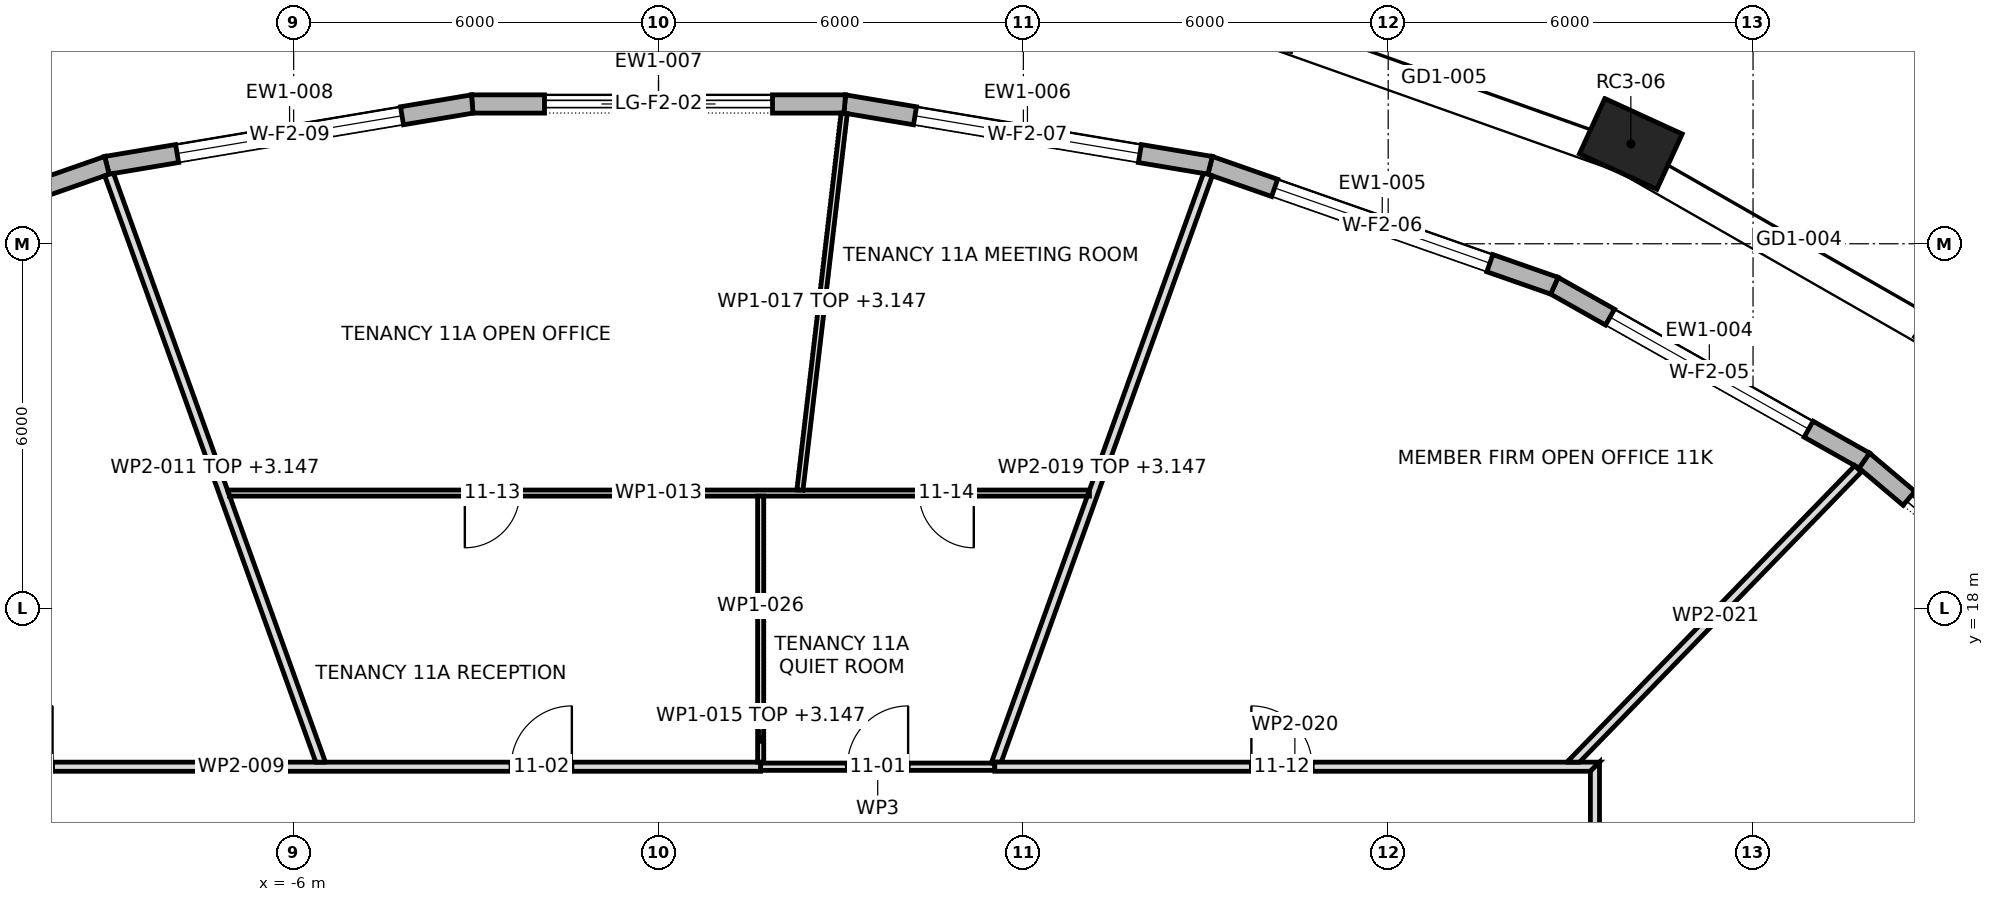
"""IFC4 building model, lengths in metres.
Left out: names, types, materials, properties, quantities, classifications, styles, units other than length and angle.
Written with IfcOpenShell. Run it as: python <this file> out.ifc"""

import sys

from ifc_helpers import new_model, si_unit, direction, frame, frame_2d, origin, origin_2d, place, context, subcontext, project, spatial, polyline, rectangle, outline, extrude, element, fill, save


model = new_model("IFC4")
c1 = context("Model", 3, precision=1e-05, world=origin(), true_north=direction((0.0, 1.0)))
c2 = subcontext(c1, "Body", "Model", "MODEL_VIEW")
j1 = project(units=[si_unit("LENGTHUNIT", "METRE"), si_unit("PLANEANGLEUNIT", "RADIAN")], contexts=[c1])
p1 = place(None, origin())
s1 = spatial("IfcSite", under=j1, at=p1, CompositionType="ELEMENT")
p2 = place(p1, origin())
s2 = spatial("IfcBuilding", under=s1, at=p2, CompositionType="ELEMENT")
p3 = place(p2, frame((0.0, 0.0, 154.9)))
s3 = spatial("IfcBuildingStorey", under=s2, at=p3, CompositionType="ELEMENT", Elevation=154.9)
for number, where, z_axis, x_axis in (
    (1, (21.519, 22.475, 0.0), (0.0, 0.0, 1.0), (-0.818, 0.575, 0.0)),
    (2, (15.99, 25.642, 0.0), (0.0, 0.0, 1.0), (-0.909, 0.417, 0.0)),
):
    element("IfcColumn", number, at=place(p3, frame(where, z_axis=z_axis, x_axis=x_axis)), inside=s3, PredefinedType="COLUMN", context=c2, shape_type="SweptSolid", body=[
        extrude(rectangle(XDim=1.4, YDim=1.0, at=origin_2d()), origin(), (0.0, 0.0, 1.0), 4.2),
    ])
p4 = place(p3, frame((24.165, 16.774, 0.0), z_axis=(0.0, 0.0, 1.0), x_axis=(-0.764076096085, 0.645126126732, 0.0)))
e3 = element("IfcWall", 3, at=p4, inside=s3, PredefinedType="STANDARD", context=c2, shape_type="SweptSolid", body=[
    extrude(outline(polyline([(-0.015, -0.15), (5.689, -0.15), (5.661, 0.15), (0.015, 0.15), (-0.015, -0.15)])), origin(), (0.0, 0.0, 1.0), 3.9),
])
p5 = place(p4, frame((0.962, 0.0, 0.0)))
e4 = element("IfcOpeningElement", 4, at=p5, cuts=e3, PredefinedType="OPENING", context=c2, shape_type="SweptSolid", body=[
    extrude(rectangle(XDim=3.75, YDim=3.45, at=frame_2d((1.875, 1.725))), frame((0.0, 0.162, 0.0), z_axis=(0.0, -1.0, 0.0), x_axis=(1.0, 0.0, 0.0)), (0.0, 0.0, 1.0), 0.324),
])
p6 = place(p3, frame((19.829, 20.435, 0.0), z_axis=(0.0, 0.0, 1.0), x_axis=(-0.870982130072, 0.491314694565, 0.0)))
e5 = element("IfcWall", 5, at=p6, inside=s3, PredefinedType="STANDARD", context=c2, shape_type="SweptSolid", body=[
    extrude(outline(polyline([(-0.014, -0.15), (5.865, -0.15), (5.838, 0.15), (0.014, 0.15), (-0.014, -0.15)])), origin(), (0.0, 0.0, 1.0), 3.9),
])
p7 = place(p6, frame((1.051, 0.0, 0.6)))
e6 = element("IfcOpeningElement", 6, at=p7, cuts=e5, PredefinedType="OPENING", context=c2, shape_type="SweptSolid", body=[
    extrude(rectangle(XDim=3.75, YDim=2.85, at=frame_2d((1.875, 1.425))), frame((0.0, 0.162, 0.0), z_axis=(0.0, -1.0, 0.0), x_axis=(1.0, 0.0, 0.0)), (0.0, 0.0, 1.0), 0.324),
])
p8 = place(p3, frame((14.732, 23.31, 0.0), z_axis=(0.0, 0.0, 1.0), x_axis=(-0.943944636678, 0.330103806228, 0.0)))
e7 = element("IfcWall", 7, at=p8, inside=s3, PredefinedType="STANDARD", context=c2, shape_type="SweptSolid", body=[
    extrude(outline(polyline([(-0.013, -0.15), (6.01, -0.15), (5.985, 0.15), (0.013, 0.15), (-0.013, -0.15)])), origin(), (0.0, 0.0, 1.0), 3.9),
])
p9 = place(p8, frame((1.124, 0.0, 0.6)))
e8 = element("IfcOpeningElement", 8, at=p9, cuts=e7, PredefinedType="OPENING", context=c2, shape_type="SweptSolid", body=[
    extrude(rectangle(XDim=3.75, YDim=2.85, at=frame_2d((1.875, 1.425))), frame((0.0, 0.162, 0.0), z_axis=(0.0, -1.0, 0.0), x_axis=(1.0, 0.0, 0.0)), (0.0, 0.0, 1.0), 0.324),
])
p10 = place(p3, frame((9.071, 25.29, 0.0), z_axis=(0.0, 0.0, 1.0), x_axis=(-0.98618955457, 0.165620537547, 0.0)))
e9 = element("IfcWall", 9, at=p10, inside=s3, PredefinedType="STANDARD", context=c2, shape_type="SweptSolid", body=[
    extrude(outline(polyline([(-0.013, -0.15), (6.105, -0.15), (6.08, 0.15), (0.013, 0.15), (-0.013, -0.15)])), origin(), (0.0, 0.0, 1.0), 3.9),
])
p11 = place(p10, frame((1.171, 0.0, 0.6)))
e10 = element("IfcOpeningElement", 10, at=p11, cuts=e9, PredefinedType="OPENING", context=c2, shape_type="SweptSolid", body=[
    extrude(rectangle(XDim=3.75, YDim=2.85, at=frame_2d((1.875, 1.425))), frame((0.0, 0.162, 0.0), z_axis=(0.0, -1.0, 0.0), x_axis=(1.0, 0.0, 0.0)), (0.0, 0.0, 1.0), 0.324),
])
p12 = place(p3, frame((3.063, 26.299, 0.0), z_axis=(0.0, 0.0, 1.0), x_axis=(-1.0, 0.0, 0.0)))
e11 = element("IfcWall", 11, at=p12, inside=s3, PredefinedType="STANDARD", context=c2, shape_type="SweptSolid", body=[
    extrude(outline(polyline([(-0.012, -0.15), (6.138, -0.15), (6.114, 0.15), (0.012, 0.15), (-0.012, -0.15)])), origin(), (0.0, 0.0, 1.0), 3.9),
])
p13 = place(p12, frame((1.188, 0.0, 0.0)))
e12 = element("IfcOpeningElement", 12, at=p13, cuts=e11, PredefinedType="OPENING", context=c2, shape_type="SweptSolid", body=[
    extrude(rectangle(XDim=3.75, YDim=3.45, at=frame_2d((1.875, 1.725))), frame((0.0, 0.162, 0.0), z_axis=(0.0, -1.0, 0.0), x_axis=(1.0, 0.0, 0.0)), (0.0, 0.0, 1.0), 0.324),
])
p14 = place(p3, frame((-3.063, 26.299, 0.0), z_axis=(0.0, 0.0, 1.0), x_axis=(-0.98618955457, -0.165620537547, 0.0)))
e13 = element("IfcWall", 13, at=p14, inside=s3, PredefinedType="STANDARD", context=c2, shape_type="SweptSolid", body=[
    extrude(outline(polyline([(-0.012, -0.15), (6.105, -0.15), (6.08, 0.15), (0.012, 0.15), (-0.012, -0.15)])), origin(), (0.0, 0.0, 1.0), 3.9),
])
p15 = place(p14, frame((1.171, 0.0, 0.6)))
e14 = element("IfcOpeningElement", 14, at=p15, cuts=e13, PredefinedType="OPENING", context=c2, shape_type="SweptSolid", body=[
    extrude(rectangle(XDim=3.75, YDim=2.85, at=frame_2d((1.875, 1.425))), frame((0.0, 0.162, 0.0), z_axis=(0.0, -1.0, 0.0), x_axis=(1.0, 0.0, 0.0)), (0.0, 0.0, 1.0), 0.324),
])
p16 = place(p3, frame((-9.071, 25.29, 0.0), z_axis=(0.0, 0.0, 1.0), x_axis=(-0.943944636678, -0.330103806228, 0.0)))
e15 = element("IfcWall", 15, at=p16, inside=s3, PredefinedType="STANDARD", context=c2, shape_type="SweptSolid", body=[
    extrude(outline(polyline([(-0.013, -0.15), (6.011, -0.15), (5.984, 0.15), (0.013, 0.15), (-0.013, -0.15)])), origin(), (0.0, 0.0, 1.0), 3.9),
])
p17 = place(p16, frame((1.124, 0.0, 0.6)))
e16 = element("IfcOpeningElement", 16, at=p17, cuts=e15, PredefinedType="OPENING", context=c2, shape_type="SweptSolid", body=[
    extrude(rectangle(XDim=3.75, YDim=2.85, at=frame_2d((1.875, 1.425))), frame((0.0, 0.162, 0.0), z_axis=(0.0, -1.0, 0.0), x_axis=(1.0, 0.0, 0.0)), (0.0, 0.0, 1.0), 0.324),
])
p18 = place(p3, frame((-15.475, 15.4, 0.0), z_axis=(0.0, 0.0, 1.0), x_axis=(1.0, 0.0, 0.0)))
e17 = element("IfcWall", 17, at=p18, inside=s3, PredefinedType="PARTITIONING", context=c2, shape_type="SweptSolid", body=[
    extrude(outline(polyline([(17.155, 0.075), (15.249, 0.075), (13.343, 0.075), (11.437, 0.075), (9.531, 0.075), (7.625, 0.075), (5.719, 0.075), (3.812, 0.075), (1.906, 0.075), (0.0, 0.075), (0.15, -0.075), (2.04, -0.075), (3.929, -0.075), (5.818, -0.075), (7.708, -0.075), (9.597, -0.075), (11.487, -0.075), (13.376, -0.075), (15.266, -0.075), (17.155, -0.075), (17.155, 0.075)])), origin(), (0.0, 0.0, 1.0), 3.9),
])
p19 = place(p18, frame((13.05, 0.0, 0.0)))
e18 = element("IfcOpeningElement", 18, at=p19, cuts=e17, PredefinedType="OPENING", context=c2, shape_type="SweptSolid", body=[
    extrude(rectangle(XDim=1.0, YDim=2.1, at=frame_2d((0.5, 1.05))), frame((0.0, 0.087, 0.0), z_axis=(0.0, -1.0, 0.0), x_axis=(1.0, 0.0, 0.0)), (0.0, 0.0, 1.0), 0.174),
])
p20 = place(p18, frame((4.51, 0.0, 0.0)))
e19 = element("IfcOpeningElement", 19, at=p20, cuts=e17, PredefinedType="OPENING", context=c2, shape_type="SweptSolid", body=[
    extrude(rectangle(XDim=1.0, YDim=2.1, at=frame_2d((0.5, 1.05))), frame((0.0, 0.087, 0.0), z_axis=(0.0, -1.0, 0.0), x_axis=(1.0, 0.0, 0.0)), (0.0, 0.0, 1.0), 0.174),
])
p21 = place(p3, frame((-9.037, 25.143, 0.0), z_axis=(0.0, 0.0, 1.0), x_axis=(0.338668278724, -0.940905838533, 0.0)))
e20 = element("IfcWall", 20, at=p21, inside=s3, PredefinedType="PARTITIONING", context=c2, shape_type="SweptSolid", body=[
    extrude(outline(polyline([(0.0, -0.075), (1.708, -0.075), (3.416, -0.075), (5.124, -0.075), (6.832, -0.075), (8.541, -0.075), (10.249, -0.075), (10.3, 0.069), (10.3, 0.069), (10.302, 0.074), (10.302, 0.075), (8.752, 0.075), (7.203, 0.075), (5.653, 0.075), (5.653, 0.074), (5.651, 0.075), (3.772, 0.075), (1.893, 0.075), (0.014, 0.075), (0.0, 0.003), (0.0, -0.054), (0.0, -0.075)])), origin(), (0.0, 0.0, 1.0), 3.147),
])
p22 = place(p3, frame((-7.087, 19.9, 0.0), z_axis=(0.0, 0.0, 1.0), x_axis=(1.0, 0.0, 0.0)))
e21 = element("IfcWall", 21, at=p22, inside=s3, PredefinedType="PARTITIONING", context=c2, shape_type="SweptSolid", body=[
    extrude(outline(polyline([(0.036, -0.05), (1.772, -0.05), (3.508, -0.05), (5.245, -0.05), (6.981, -0.05), (8.717, -0.05), (8.717, -0.05), (8.817, -0.05), (8.817, -0.05), (10.591, -0.05), (12.365, -0.05), (14.139, -0.05), (14.175, 0.049), (14.175, 0.05), (12.604, 0.05), (11.034, 0.05), (9.464, 0.05), (9.464, 0.049), (9.454, 0.05), (7.563, 0.05), (5.672, 0.05), (3.781, 0.05), (1.891, 0.05), (0.0, 0.05), (0.0, 0.049), (0.036, -0.05)])), origin(), (0.0, 0.0, 1.0), 3.9),
])
p23 = place(p22, frame((3.903, 0.0, 0.0)))
e22 = element("IfcOpeningElement", 22, at=p23, cuts=e21, PredefinedType="OPENING", context=c2, shape_type="SweptSolid", body=[
    extrude(rectangle(XDim=0.9, YDim=2.1, at=frame_2d((0.45, 1.05))), frame((0.0, 0.062, 0.0), z_axis=(0.0, -1.0, 0.0), x_axis=(1.0, 0.0, 0.0)), (0.0, 0.0, 1.0), 0.124),
])
p24 = place(p22, frame((11.373, 0.0, 0.0)))
e23 = element("IfcOpeningElement", 23, at=p24, cuts=e21, PredefinedType="OPENING", context=c2, shape_type="SweptSolid", body=[
    extrude(rectangle(XDim=0.9, YDim=2.1, at=frame_2d((0.45, 1.05))), frame((0.0, 0.062, 0.0), z_axis=(0.0, -1.0, 0.0), x_axis=(1.0, 0.0, 0.0)), (0.0, 0.0, 1.0), 0.124),
])
p25 = place(p3, frame((1.68, 15.46, 0.0), z_axis=(0.0, 0.0, 1.0), x_axis=(0.0, 1.0, 0.0)))
e24 = element("IfcWall", 24, at=p25, inside=s3, PredefinedType="PARTITIONING", context=c2, shape_type="SweptSolid", body=[
    extrude(outline(polyline([(0.777, 0.05), (0.015, 0.05), (0.015, 0.0), (0.0, 0.0), (0.0, -0.05), (0.777, -0.05), (0.777, 0.05)])), origin(), (0.0, 0.0, 1.0), 3.147),
])
p26 = place(p3, frame((1.68, 15.4, 0.0), z_axis=(0.0, 0.0, 1.0), x_axis=(1.0, 0.0, 0.0)))
e25 = element("IfcWall", 25, at=p26, inside=s3, PredefinedType="PARTITIONING", context=c2, shape_type="SweptSolid", body=[
    extrude(rectangle(XDim=3.85, YDim=0.12, at=frame_2d((1.925, 0.0))), origin(), (0.0, 0.0, 1.0), 3.9),
])
p27 = place(p26, frame((1.425, 0.0, 0.0)))
e26 = element("IfcOpeningElement", 26, at=p27, cuts=e25, PredefinedType="OPENING", context=c2, shape_type="SweptSolid", body=[
    extrude(rectangle(XDim=1.0, YDim=2.1, at=frame_2d((0.5, 1.05))), frame((0.0, 0.072, 0.0), z_axis=(0.0, -1.0, 0.0), x_axis=(1.0, 0.0, 0.0)), (0.0, 0.0, 1.0), 0.144),
])
p28 = place(p3, frame((2.325, 19.944, 0.0), z_axis=(0.0, 0.0, 1.0), x_axis=(0.116750504681, 0.993161275754, 0.0)))
e27 = element("IfcWall", 27, at=p28, inside=s3, PredefinedType="PARTITIONING", context=c2, shape_type="SweptSolid", body=[
    extrude(outline(polyline([(6.244, -0.05), (6.244, 0.027), (6.241, 0.05), (4.681, 0.05), (3.121, 0.05), (1.56, 0.05), (0.0, 0.05), (0.012, -0.05), (1.57, -0.05), (3.128, -0.05), (4.686, -0.05), (6.244, -0.05)])), origin(), (0.0, 0.0, 1.0), 3.147),
])
p29 = place(p3, frame((5.542, 15.435, 0.0), z_axis=(0.0, 0.0, 1.0), x_axis=(0.338661655399, 0.940908222497, 0.0)))
e28 = element("IfcWall", 28, at=p29, inside=s3, PredefinedType="PARTITIONING", context=c2, shape_type="SweptSolid", body=[
    extrude(outline(polyline([(10.318, -0.075), (10.318, -0.043), (10.318, 0.003), (10.305, 0.075), (8.46, 0.075), (6.615, 0.075), (4.77, 0.075), (4.677, 0.042), (4.666, 0.075), (3.11, 0.075), (1.555, 0.075), (0.0, 0.075), (0.0, 0.074), (0.02, 0.02), (0.034, 0.025), (0.07, -0.075), (1.778, -0.075), (3.486, -0.075), (5.194, -0.075), (6.902, -0.075), (8.61, -0.075), (10.318, -0.075)])), origin(), (0.0, 0.0, 1.0), 3.147),
])
p30 = place(p3, frame((5.53, 15.4, 0.0), z_axis=(0.0, 0.0, 1.0), x_axis=(1.0, 0.0, 0.0)))
e29 = element("IfcWall", 29, at=p30, inside=s3, PredefinedType="PARTITIONING", context=c2, shape_type="SweptSolid", body=[
    extrude(outline(polyline([(0.0, -0.075), (1.959, -0.075), (3.918, -0.075), (5.877, -0.075), (7.836, -0.075), (9.795, -0.075), (9.945, 0.075), (7.956, 0.075), (5.967, 0.075), (3.978, 0.075), (1.989, 0.075), (0.0, 0.075), (0.0, -0.075)])), origin(), (0.0, 0.0, 1.0), 3.9),
])
p31 = place(p30, frame((4.22, 0.0, 0.0)))
e30 = element("IfcOpeningElement", 30, at=p31, cuts=e29, PredefinedType="OPENING", context=c2, shape_type="SweptSolid", body=[
    extrude(rectangle(XDim=1.0, YDim=2.1, at=frame_2d((0.5, 1.05))), frame((0.0, 0.087, 0.0), z_axis=(0.0, -1.0, 0.0), x_axis=(1.0, 0.0, 0.0)), (0.0, 0.0, 1.0), 0.174),
])
p32 = place(p3, frame((14.992, 15.423, 0.0), z_axis=(0.0, 0.0, 1.0), x_axis=(0.696574400919, 0.71748456707, 0.0)))
e31 = element("IfcWall", 31, at=p32, inside=s3, PredefinedType="PARTITIONING", context=c2, shape_type="SweptSolid", body=[
    extrude(outline(polyline([(0.0, 0.075), (0.0, 0.074), (0.145, -0.075), (1.808, -0.075), (3.47, -0.075), (5.133, -0.075), (6.795, -0.075), (6.795, 0.075), (5.096, 0.075), (3.397, 0.075), (1.699, 0.075), (0.0, 0.075)])), origin(), (0.0, 0.0, 1.0), 3.9),
])
p33 = place(p3, frame((15.4, -15.475, 0.0), z_axis=(0.0, 0.0, 1.0), x_axis=(0.0, 1.0, 0.0)))
e32 = element("IfcWall", 32, at=p33, inside=s3, PredefinedType="PARTITIONING", context=c2, shape_type="SweptSolid", body=[
    extrude(outline(polyline([(0.0, -0.075), (1.935, -0.075), (3.869, -0.075), (5.803, -0.075), (7.738, -0.075), (9.672, -0.075), (11.606, -0.075), (13.541, -0.075), (15.475, -0.075), (17.409, -0.075), (19.344, -0.075), (21.278, -0.075), (23.212, -0.075), (25.147, -0.075), (27.081, -0.075), (29.016, -0.075), (30.95, -0.075), (30.8, 0.075), (28.885, 0.075), (26.969, 0.075), (25.053, 0.075), (23.138, 0.075), (21.222, 0.075), (19.306, 0.075), (17.391, 0.075), (15.475, 0.075), (13.56, 0.075), (11.644, 0.075), (9.728, 0.075), (7.812, 0.075), (5.897, 0.075), (3.981, 0.075), (2.066, 0.075), (0.15, 0.075), (0.0, -0.075)])), origin(), (0.0, 0.0, 1.0), 3.9),
])
p34 = place(p33, frame((9.0, 0.0, 0.0)))
e33 = element("IfcOpeningElement", 33, at=p34, cuts=e32, PredefinedType="OPENING", context=c2, shape_type="SweptSolid", body=[
    extrude(rectangle(XDim=1.0, YDim=2.1, at=frame_2d((0.5, 1.05))), frame((0.0, 0.087, 0.0), z_axis=(0.0, -1.0, 0.0), x_axis=(1.0, 0.0, 0.0)), (0.0, 0.0, 1.0), 0.174),
])
p35 = place(p33, frame((21.635, 0.0, 0.0)))
e34 = element("IfcOpeningElement", 34, at=p35, cuts=e32, PredefinedType="OPENING", context=c2, shape_type="SweptSolid", body=[
    extrude(rectangle(XDim=1.8, YDim=2.1, at=frame_2d((0.9, 1.05))), frame((0.0, 0.087, 0.0), z_axis=(0.0, -1.0, 0.0), x_axis=(1.0, 0.0, 0.0)), (0.0, 0.0, 1.0), 0.174),
])
p36 = place(p3, frame((1.68, 16.237, 0.0), z_axis=(0.0, 0.0, 1.0), x_axis=(0.0, 1.0, 0.0)))
e35 = element("IfcWall", 35, at=p36, inside=s3, PredefinedType="PARTITIONING", context=c2, shape_type="SweptSolid", body=[
    extrude(outline(polyline([(0.0, -0.05), (1.806, -0.05), (3.613, -0.05), (3.613, 0.05), (1.806, 0.05), (0.0, 0.05), (0.0, -0.05)])), origin(), (0.0, 0.0, 1.0), 3.9),
])
p37 = place(p5, origin())
e36 = element("IfcDoor", 36, at=p37, inside=s3, OperationType="DOUBLE_DOOR_SLIDING", PredefinedType="DOOR", context=c2, shape_type="SweptSolid", body=[
    extrude(rectangle(XDim=3.75, YDim=3.45, at=frame_2d((1.875, 1.725))), frame((0.0, 0.025, 0.0), z_axis=(0.0, -1.0, 0.0), x_axis=(1.0, 0.0, 0.0)), (0.0, 0.0, 1.0), 0.05),
])
fill(e4, e36)
p38 = place(p7, origin())
e37 = element("IfcWindow", 37, at=p38, inside=s3, PartitioningType="TRIPLE_PANEL_VERTICAL", PredefinedType="WINDOW", context=c2, shape_type="SweptSolid", body=[
    extrude(rectangle(XDim=3.75, YDim=2.85, at=frame_2d((1.875, 1.425))), frame((0.0, 0.03, 0.0), z_axis=(0.0, -1.0, 0.0), x_axis=(1.0, 0.0, 0.0)), (0.0, 0.0, 1.0), 0.06),
])
fill(e6, e37)
p39 = place(p9, origin())
e38 = element("IfcWindow", 38, at=p39, inside=s3, PartitioningType="TRIPLE_PANEL_VERTICAL", PredefinedType="WINDOW", context=c2, shape_type="SweptSolid", body=[
    extrude(rectangle(XDim=3.75, YDim=2.85, at=frame_2d((1.875, 1.425))), frame((0.0, 0.03, 0.0), z_axis=(0.0, -1.0, 0.0), x_axis=(1.0, 0.0, 0.0)), (0.0, 0.0, 1.0), 0.06),
])
fill(e8, e38)
p40 = place(p11, origin())
e39 = element("IfcWindow", 39, at=p40, inside=s3, PartitioningType="TRIPLE_PANEL_VERTICAL", PredefinedType="WINDOW", context=c2, shape_type="SweptSolid", body=[
    extrude(rectangle(XDim=3.75, YDim=2.85, at=frame_2d((1.875, 1.425))), frame((0.0, 0.03, 0.0), z_axis=(0.0, -1.0, 0.0), x_axis=(1.0, 0.0, 0.0)), (0.0, 0.0, 1.0), 0.06),
])
fill(e10, e39)
p41 = place(p13, origin())
e40 = element("IfcDoor", 40, at=p41, inside=s3, OperationType="DOUBLE_DOOR_SLIDING", PredefinedType="DOOR", context=c2, shape_type="SweptSolid", body=[
    extrude(rectangle(XDim=3.75, YDim=3.45, at=frame_2d((1.875, 1.725))), frame((0.0, 0.025, 0.0), z_axis=(0.0, -1.0, 0.0), x_axis=(1.0, 0.0, 0.0)), (0.0, 0.0, 1.0), 0.05),
])
fill(e12, e40)
p42 = place(p15, origin())
e41 = element("IfcWindow", 41, at=p42, inside=s3, PartitioningType="TRIPLE_PANEL_VERTICAL", PredefinedType="WINDOW", context=c2, shape_type="SweptSolid", body=[
    extrude(rectangle(XDim=3.75, YDim=2.85, at=frame_2d((1.875, 1.425))), frame((0.0, 0.03, 0.0), z_axis=(0.0, -1.0, 0.0), x_axis=(1.0, 0.0, 0.0)), (0.0, 0.0, 1.0), 0.06),
])
fill(e14, e41)
p43 = place(p27, origin())
e42 = element("IfcDoor", 42, at=p43, inside=s3, OperationType="SINGLE_SWING_LEFT", PredefinedType="DOOR", context=c2, shape_type="SweptSolid", body=[
    extrude(rectangle(XDim=1.0, YDim=2.1, at=frame_2d((0.5, 1.05))), frame((0.0, 0.025, 0.0), z_axis=(0.0, -1.0, 0.0), x_axis=(1.0, 0.0, 0.0)), (0.0, 0.0, 1.0), 0.05),
])
fill(e26, e42)
p44 = place(p19, origin())
e43 = element("IfcDoor", 43, at=p44, inside=s3, OperationType="SINGLE_SWING_LEFT", PredefinedType="DOOR", context=c2, shape_type="SweptSolid", body=[
    extrude(rectangle(XDim=1.0, YDim=2.1, at=frame_2d((0.5, 1.05))), frame((0.0, 0.025, 0.0), z_axis=(0.0, -1.0, 0.0), x_axis=(1.0, 0.0, 0.0)), (0.0, 0.0, 1.0), 0.05),
])
fill(e18, e43)
p45 = place(p31, origin())
e44 = element("IfcDoor", 44, at=p45, inside=s3, OperationType="SINGLE_SWING_RIGHT", PredefinedType="DOOR", context=c2, shape_type="SweptSolid", body=[
    extrude(rectangle(XDim=1.0, YDim=2.1, at=frame_2d((0.5, 1.05))), frame((0.0, 0.025, 0.0), z_axis=(0.0, -1.0, 0.0), x_axis=(1.0, 0.0, 0.0)), (0.0, 0.0, 1.0), 0.05),
])
fill(e30, e44)
p46 = place(p23, frame((0.9, 0.0, 0.0), z_axis=(0.0, 0.0, 1.0), x_axis=(-1.0, 0.0, 0.0)))
e45 = element("IfcDoor", 45, at=p46, inside=s3, OperationType="SINGLE_SWING_LEFT", PredefinedType="DOOR", context=c2, shape_type="SweptSolid", body=[
    extrude(rectangle(XDim=0.9, YDim=2.1, at=frame_2d((0.45, 1.05))), frame((0.0, 0.025, 0.0), z_axis=(0.0, -1.0, 0.0), x_axis=(1.0, 0.0, 0.0)), (0.0, 0.0, 1.0), 0.05),
])
fill(e22, e45)
p47 = place(p24, frame((0.9, 0.0, 0.0), z_axis=(0.0, 0.0, 1.0), x_axis=(-1.0, 0.0, 0.0)))
e46 = element("IfcDoor", 46, at=p47, inside=s3, OperationType="SINGLE_SWING_RIGHT", PredefinedType="DOOR", context=c2, shape_type="SweptSolid", body=[
    extrude(rectangle(XDim=0.9, YDim=2.1, at=frame_2d((0.45, 1.05))), frame((0.0, 0.025, 0.0), z_axis=(0.0, -1.0, 0.0), x_axis=(1.0, 0.0, 0.0)), (0.0, 0.0, 1.0), 0.05),
])
fill(e23, e46)
save(model, sys.argv[1])
